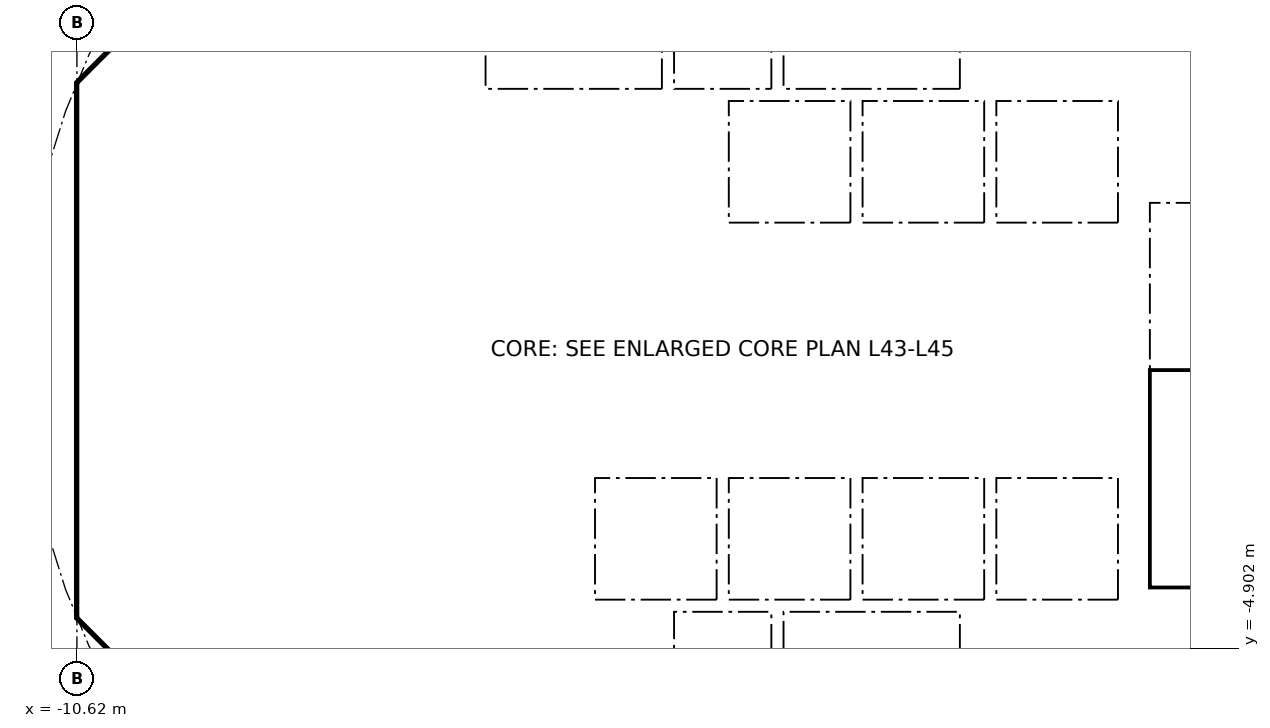
"""IFC4 building model, lengths in metres.
Left out: names, types, materials, properties, quantities, classifications, styles, units other than length and angle.
Written with IfcOpenShell. Run it as: python <this file> out.ifc"""

import sys

from ifc_helpers import new_model, si_unit, direction, frame, frame_2d, origin, place, context, subcontext, project, spatial, polyline, rectangle, outline, extrude, element, fill, save


model = new_model("IFC4")
c1 = context("Model", 3, precision=1e-05, world=origin(), true_north=direction((0.0, 1.0)))
c2 = subcontext(c1, "Body", "Model", "MODEL_VIEW")
j1 = project(units=[si_unit("LENGTHUNIT", "METRE"), si_unit("PLANEANGLEUNIT", "RADIAN")], contexts=[c1])
p1 = place(None, origin())
s1 = spatial("IfcSite", under=j1, at=p1, CompositionType="ELEMENT")
p2 = place(p1, origin())
s2 = spatial("IfcBuilding", under=s1, at=p2, CompositionType="ELEMENT")
p3 = place(p2, frame((0.0, 0.0, 177.0)))
s3 = spatial("IfcBuildingStorey", under=s2, at=p3, CompositionType="ELEMENT", Elevation=177.0)
p4 = place(p3, frame((9.988, 4.613, 0.0), z_axis=(0.0, 0.0, 1.0), x_axis=(-0.707106781187, 0.707106781187, 0.0)))
e1 = element("IfcWall", 1, at=p4, inside=s3, PredefinedType="SHEAR", context=c2, shape_type="SweptSolid", body=[
    extrude(rectangle(XDim=7.602, YDim=0.6, at=frame_2d((3.801, 0.0))), origin(), (0.0, 0.0, 1.0), 3.44),
])
p5 = place(p4, frame((3.201, 0.0, 0.0)))
e2 = element("IfcOpeningElement", 2, at=p5, cuts=e1, PredefinedType="OPENING", context=c2, shape_type="SweptSolid", body=[
    extrude(rectangle(XDim=1.2, YDim=2.1, at=frame_2d((0.6, 1.05))), frame((0.0, 0.31, 0.0), z_axis=(0.0, -1.0, 0.0), x_axis=(1.0, 0.0, 0.0)), (0.0, 0.0, 1.0), 0.62),
])
p6 = place(p3, frame((-4.613, 9.988, 0.0), z_axis=(0.0, 0.0, 1.0), x_axis=(-0.707106781187, -0.707106781187, 0.0)))
e3 = element("IfcWall", 3, at=p6, inside=s3, PredefinedType="SHEAR", context=c2, shape_type="SweptSolid", body=[
    extrude(rectangle(XDim=7.602, YDim=0.6, at=frame_2d((3.801, 0.0))), origin(), (0.0, 0.0, 1.0), 3.44),
])
p7 = place(p6, frame((0.351, 0.0, 0.0)))
e4 = element("IfcOpeningElement", 4, at=p7, cuts=e3, PredefinedType="OPENING", context=c2, shape_type="SweptSolid", body=[
    extrude(rectangle(XDim=1.1, YDim=2.1, at=frame_2d((0.55, 1.05))), frame((0.0, 0.31, 0.0), z_axis=(0.0, -1.0, 0.0), x_axis=(1.0, 0.0, 0.0)), (0.0, 0.0, 1.0), 0.62),
])
p8 = place(p3, frame((-10.325, 3.801, 0.0), z_axis=(0.0, 0.0, 1.0), x_axis=(0.0, -1.0, 0.0)))
e5 = element("IfcWall", 5, at=p8, inside=s3, PredefinedType="SHEAR", context=c2, shape_type="SweptSolid", body=[
    extrude(rectangle(XDim=7.602, YDim=0.6, at=frame_2d((3.801, 0.0))), origin(), (0.0, 0.0, 1.0), 3.44),
])
p9 = place(p8, frame((0.651, 0.0, 0.0)))
e6 = element("IfcOpeningElement", 6, at=p9, cuts=e5, PredefinedType="OPENING", context=c2, shape_type="SweptSolid", body=[
    extrude(rectangle(XDim=1.5, YDim=2.1, at=frame_2d((0.75, 1.05))), frame((0.0, 0.31, 0.0), z_axis=(0.0, -1.0, 0.0), x_axis=(1.0, 0.0, 0.0)), (0.0, 0.0, 1.0), 0.62),
])
p10 = place(p8, frame((5.451, 0.0, 0.0)))
e7 = element("IfcOpeningElement", 7, at=p10, cuts=e5, PredefinedType="OPENING", context=c2, shape_type="SweptSolid", body=[
    extrude(rectangle(XDim=1.5, YDim=2.1, at=frame_2d((0.75, 1.05))), frame((0.0, 0.31, 0.0), z_axis=(0.0, -1.0, 0.0), x_axis=(1.0, 0.0, 0.0)), (0.0, 0.0, 1.0), 0.62),
])
p11 = place(p3, frame((-9.988, -4.613, 0.0), z_axis=(0.0, 0.0, 1.0), x_axis=(0.707106781187, -0.707106781187, 0.0)))
e8 = element("IfcWall", 8, at=p11, inside=s3, PredefinedType="SHEAR", context=c2, shape_type="SweptSolid", body=[
    extrude(rectangle(XDim=7.602, YDim=0.6, at=frame_2d((3.801, 0.0))), origin(), (0.0, 0.0, 1.0), 3.44),
])
p12 = place(p11, frame((6.151, 0.0, 0.0)))
e9 = element("IfcOpeningElement", 9, at=p12, cuts=e8, PredefinedType="OPENING", context=c2, shape_type="SweptSolid", body=[
    extrude(rectangle(XDim=1.1, YDim=2.1, at=frame_2d((0.55, 1.05))), frame((0.0, 0.31, 0.0), z_axis=(0.0, -1.0, 0.0), x_axis=(1.0, 0.0, 0.0)), (0.0, 0.0, 1.0), 0.62),
])
p13 = place(p3, frame((4.613, -9.988, 0.0), z_axis=(0.0, 0.0, 1.0), x_axis=(0.707106781187, 0.707106781187, 0.0)))
e10 = element("IfcWall", 10, at=p13, inside=s3, PredefinedType="SHEAR", context=c2, shape_type="SweptSolid", body=[
    extrude(rectangle(XDim=7.602, YDim=0.6, at=frame_2d((3.801, 0.0))), origin(), (0.0, 0.0, 1.0), 3.44),
])
p14 = place(p13, frame((3.201, 0.0, 0.0)))
e11 = element("IfcOpeningElement", 11, at=p14, cuts=e10, PredefinedType="OPENING", context=c2, shape_type="SweptSolid", body=[
    extrude(rectangle(XDim=1.2, YDim=2.1, at=frame_2d((0.6, 1.05))), frame((0.0, 0.31, 0.0), z_axis=(0.0, -1.0, 0.0), x_axis=(1.0, 0.0, 0.0)), (0.0, 0.0, 1.0), 0.62),
])
p15 = place(p3, frame((-5.8, 4.3, 0.0), z_axis=(0.0, 0.0, 1.0), x_axis=(0.0, 1.0, 0.0)))
e12 = element("IfcWall", 12, at=p15, inside=s3, PredefinedType="PARTITIONING", context=c2, shape_type="SweptSolid", body=[
    extrude(rectangle(XDim=3.927, YDim=0.15, at=frame_2d((1.963, 0.0))), origin(), (0.0, 0.0, 1.0), 3.44),
])
p16 = place(p15, frame((0.413, 0.0, 0.0)))
e13 = element("IfcOpeningElement", 13, at=p16, cuts=e12, PredefinedType="OPENING", context=c2, shape_type="SweptSolid", body=[
    extrude(rectangle(XDim=0.9, YDim=2.1, at=frame_2d((0.45, 1.05))), frame((0.0, 0.085, 0.0), z_axis=(0.0, -1.0, 0.0), x_axis=(1.0, 0.0, 0.0)), (0.0, 0.0, 1.0), 0.17),
])
p17 = place(p15, frame((2.489, 0.0, 0.0)))
e14 = element("IfcOpeningElement", 14, at=p17, cuts=e12, PredefinedType="OPENING", context=c2, shape_type="SweptSolid", body=[
    extrude(rectangle(XDim=0.9, YDim=2.1, at=frame_2d((0.45, 1.05))), frame((0.0, 0.085, 0.0), z_axis=(0.0, -1.0, 0.0), x_axis=(1.0, 0.0, 0.0)), (0.0, 0.0, 1.0), 0.17),
])
p18 = place(p3, frame((4.0, 4.3, 0.0), z_axis=(0.0, 0.0, 1.0), x_axis=(0.0, 1.0, 0.0)))
e15 = element("IfcWall", 15, at=p18, inside=s3, PredefinedType="SOLIDWALL", context=c2, shape_type="SweptSolid", body=[
    extrude(rectangle(XDim=2.2, YDim=0.2, at=frame_2d((1.1, 0.0))), origin(), (0.0, 0.0, 1.0), 3.44),
])
p19 = place(p18, frame((0.55, 0.0, 0.0)))
e16 = element("IfcOpeningElement", 16, at=p19, cuts=e15, PredefinedType="OPENING", context=c2, shape_type="SweptSolid", body=[
    extrude(rectangle(XDim=1.1, YDim=2.1, at=frame_2d((0.55, 1.05))), frame((0.0, 0.11, 0.0), z_axis=(0.0, -1.0, 0.0), x_axis=(1.0, 0.0, 0.0)), (0.0, 0.0, 1.0), 0.22),
])
p20 = place(p3, frame((-4.0, 4.3, 0.0), z_axis=(0.0, 0.0, 1.0), x_axis=(0.0, 1.0, 0.0)))
e17 = element("IfcWall", 17, at=p20, inside=s3, PredefinedType="SOLIDWALL", context=c2, shape_type="SweptSolid", body=[
    extrude(rectangle(XDim=2.2, YDim=0.2, at=frame_2d((1.1, 0.0))), origin(), (0.0, 0.0, 1.0), 3.44),
])
p21 = place(p20, frame((0.55, 0.0, 0.0)))
e18 = element("IfcOpeningElement", 18, at=p21, cuts=e17, PredefinedType="OPENING", context=c2, shape_type="SweptSolid", body=[
    extrude(rectangle(XDim=1.1, YDim=2.1, at=frame_2d((0.55, 1.05))), frame((0.0, 0.11, 0.0), z_axis=(0.0, -1.0, 0.0), x_axis=(1.0, 0.0, 0.0)), (0.0, 0.0, 1.0), 0.22),
])
p22 = place(p3, frame((-6.7, 2.0, 0.0), z_axis=(0.0, 0.0, 1.0), x_axis=(1.0, 0.0, 0.0)))
e19 = element("IfcWall", 19, at=p22, inside=s3, PredefinedType="SOLIDWALL", context=c2, shape_type="SweptSolid", body=[
    extrude(rectangle(XDim=13.4, YDim=0.2, at=frame_2d((6.7, 0.0))), origin(), (0.0, 0.0, 1.0), 3.44),
])
p23 = place(p22, frame((7.25, 0.0, 0.0)))
e20 = element("IfcOpeningElement", 20, at=p23, cuts=e19, PredefinedType="OPENING", context=c2, shape_type="SweptSolid", body=[
    extrude(rectangle(XDim=1.1, YDim=2.1, at=frame_2d((0.55, 1.05))), frame((0.0, 0.11, 0.0), z_axis=(0.0, -1.0, 0.0), x_axis=(1.0, 0.0, 0.0)), (0.0, 0.0, 1.0), 0.22),
])
p24 = place(p22, frame((9.45, 0.0, 0.0)))
e21 = element("IfcOpeningElement", 21, at=p24, cuts=e19, PredefinedType="OPENING", context=c2, shape_type="SweptSolid", body=[
    extrude(rectangle(XDim=1.1, YDim=2.1, at=frame_2d((0.55, 1.05))), frame((0.0, 0.11, 0.0), z_axis=(0.0, -1.0, 0.0), x_axis=(1.0, 0.0, 0.0)), (0.0, 0.0, 1.0), 0.22),
])
p25 = place(p22, frame((0.75, 0.0, 0.0)))
e22 = element("IfcOpeningElement", 22, at=p25, cuts=e19, PredefinedType="OPENING", context=c2, shape_type="SweptSolid", body=[
    extrude(rectangle(XDim=0.9, YDim=2.1, at=frame_2d((0.45, 1.05))), frame((0.0, 0.11, 0.0), z_axis=(0.0, -1.0, 0.0), x_axis=(1.0, 0.0, 0.0)), (0.0, 0.0, 1.0), 0.22),
])
p26 = place(p22, frame((4.05, 0.0, 0.0)))
e23 = element("IfcOpeningElement", 23, at=p26, cuts=e19, PredefinedType="OPENING", context=c2, shape_type="SweptSolid", body=[
    extrude(rectangle(XDim=0.9, YDim=2.1, at=frame_2d((0.45, 1.05))), frame((0.0, 0.11, 0.0), z_axis=(0.0, -1.0, 0.0), x_axis=(1.0, 0.0, 0.0)), (0.0, 0.0, 1.0), 0.22),
])
p27 = place(p3, frame((6.7, 4.0, 0.0), z_axis=(0.0, 0.0, 1.0), x_axis=(1.0, 0.0, 0.0)))
e24 = element("IfcWall", 24, at=p27, inside=s3, PredefinedType="SOLIDWALL", context=c2, shape_type="SweptSolid", body=[
    extrude(rectangle(XDim=3.325, YDim=0.2, at=frame_2d((1.662, 0.0))), origin(), (0.0, 0.0, 1.0), 3.44),
])
p28 = place(p27, frame((1.25, 0.0, 0.0)))
e25 = element("IfcOpeningElement", 25, at=p28, cuts=e24, PredefinedType="OPENING", context=c2, shape_type="SweptSolid", body=[
    extrude(rectangle(XDim=1.1, YDim=2.1, at=frame_2d((0.55, 1.05))), frame((0.0, 0.11, 0.0), z_axis=(0.0, -1.0, 0.0), x_axis=(1.0, 0.0, 0.0)), (0.0, 0.0, 1.0), 0.22),
])
p29 = place(p3, frame((-6.2, -7.827, 0.0), z_axis=(0.0, 0.0, 1.0), x_axis=(0.0, 1.0, 0.0)))
e26 = element("IfcWall", 26, at=p29, inside=s3, PredefinedType="PARTITIONING", context=c2, shape_type="SweptSolid", body=[
    extrude(rectangle(XDim=3.527, YDim=0.15, at=frame_2d((1.763, 0.0))), origin(), (0.0, 0.0, 1.0), 3.44),
])
p30 = place(p29, frame((1.276, 0.0, 0.0)))
e27 = element("IfcOpeningElement", 27, at=p30, cuts=e26, PredefinedType="OPENING", context=c2, shape_type="SweptSolid", body=[
    extrude(rectangle(XDim=0.9, YDim=2.1, at=frame_2d((0.45, 1.05))), frame((0.0, 0.085, 0.0), z_axis=(0.0, -1.0, 0.0), x_axis=(1.0, 0.0, 0.0)), (0.0, 0.0, 1.0), 0.17),
])
p31 = place(p3, frame((4.0, -6.5, 0.0), z_axis=(0.0, 0.0, 1.0), x_axis=(0.0, 1.0, 0.0)))
e28 = element("IfcWall", 28, at=p31, inside=s3, PredefinedType="SOLIDWALL", context=c2, shape_type="SweptSolid", body=[
    extrude(rectangle(XDim=2.2, YDim=0.2, at=frame_2d((1.1, 0.0))), origin(), (0.0, 0.0, 1.0), 3.44),
])
p32 = place(p31, frame((0.55, 0.0, 0.0)))
e29 = element("IfcOpeningElement", 29, at=p32, cuts=e28, PredefinedType="OPENING", context=c2, shape_type="SweptSolid", body=[
    extrude(rectangle(XDim=1.1, YDim=2.1, at=frame_2d((0.55, 1.05))), frame((0.0, 0.11, 0.0), z_axis=(0.0, -1.0, 0.0), x_axis=(1.0, 0.0, 0.0)), (0.0, 0.0, 1.0), 0.22),
])
p33 = place(p3, frame((-4.0, -6.5, 0.0), z_axis=(0.0, 0.0, 1.0), x_axis=(0.0, 1.0, 0.0)))
e30 = element("IfcWall", 30, at=p33, inside=s3, PredefinedType="SOLIDWALL", context=c2, shape_type="SweptSolid", body=[
    extrude(rectangle(XDim=2.2, YDim=0.2, at=frame_2d((1.1, 0.0))), origin(), (0.0, 0.0, 1.0), 3.44),
])
p34 = place(p33, frame((0.65, 0.0, 0.0)))
e31 = element("IfcOpeningElement", 31, at=p34, cuts=e30, PredefinedType="OPENING", context=c2, shape_type="SweptSolid", body=[
    extrude(rectangle(XDim=0.9, YDim=2.1, at=frame_2d((0.45, 1.05))), frame((0.0, 0.11, 0.0), z_axis=(0.0, -1.0, 0.0), x_axis=(1.0, 0.0, 0.0)), (0.0, 0.0, 1.0), 0.22),
])
p35 = place(p3, frame((-6.7, -2.0, 0.0), z_axis=(0.0, 0.0, 1.0), x_axis=(1.0, 0.0, 0.0)))
e32 = element("IfcWall", 32, at=p35, inside=s3, PredefinedType="SOLIDWALL", context=c2, shape_type="SweptSolid", body=[
    extrude(rectangle(XDim=13.4, YDim=0.2, at=frame_2d((6.7, 0.0))), origin(), (0.0, 0.0, 1.0), 3.44),
])
p36 = place(p35, frame((5.05, 0.0, 0.0)))
e33 = element("IfcOpeningElement", 33, at=p36, cuts=e32, PredefinedType="OPENING", context=c2, shape_type="SweptSolid", body=[
    extrude(rectangle(XDim=1.1, YDim=2.1, at=frame_2d((0.55, 1.05))), frame((0.0, 0.11, 0.0), z_axis=(0.0, -1.0, 0.0), x_axis=(1.0, 0.0, 0.0)), (0.0, 0.0, 1.0), 0.22),
])
p37 = place(p35, frame((7.25, 0.0, 0.0)))
e34 = element("IfcOpeningElement", 34, at=p37, cuts=e32, PredefinedType="OPENING", context=c2, shape_type="SweptSolid", body=[
    extrude(rectangle(XDim=1.1, YDim=2.1, at=frame_2d((0.55, 1.05))), frame((0.0, 0.11, 0.0), z_axis=(0.0, -1.0, 0.0), x_axis=(1.0, 0.0, 0.0)), (0.0, 0.0, 1.0), 0.22),
])
p38 = place(p35, frame((1.85, 0.0, 0.0)))
e35 = element("IfcOpeningElement", 35, at=p38, cuts=e32, PredefinedType="OPENING", context=c2, shape_type="SweptSolid", body=[
    extrude(rectangle(XDim=0.9, YDim=2.1, at=frame_2d((0.45, 1.05))), frame((0.0, 0.11, 0.0), z_axis=(0.0, -1.0, 0.0), x_axis=(1.0, 0.0, 0.0)), (0.0, 0.0, 1.0), 0.22),
])
p39 = place(p3, origin())
e36 = element("IfcWall", 36, at=p39, inside=s3, PredefinedType="SHEAR", context=c2, shape_type="SweptSolid", body=[
    extrude(outline(polyline([(-10.625, -3.801), (-10.025, -3.801), (-10.025, -4.152), (-9.776, -4.401), (-10.2, -4.825), (-10.625, -4.401), (-10.625, -3.801)])), origin(), (0.0, 0.0, 1.0), 3.44),
])
p40 = place(p3, origin())
e37 = element("IfcWall", 37, at=p40, inside=s3, PredefinedType="SHEAR", context=c2, shape_type="SweptSolid", body=[
    extrude(outline(polyline([(-10.2, 4.825), (-9.776, 4.401), (-10.025, 4.152), (-10.025, 3.801), (-10.625, 3.801), (-10.625, 4.401), (-10.2, 4.825)])), origin(), (0.0, 0.0, 1.0), 3.44),
])
for number, where, z_axis, x_axis in (
    (38, (-10.025, -4.0, 0.0), (0.0, 0.0, 1.0), (1.0, 0.0, 0.0)),
    (39, (-10.025, 4.0, 0.0), (0.0, 0.0, 1.0), (1.0, 0.0, 0.0)),
):
    element("IfcWall", number, at=place(p3, frame(where, z_axis=z_axis, x_axis=x_axis)), inside=s3, PredefinedType="PARTITIONING", context=c2, shape_type="SweptSolid", body=[
        extrude(rectangle(XDim=3.325, YDim=0.2, at=frame_2d((1.662, 0.0))), origin(), (0.0, 0.0, 1.0), 3.44),
    ])
for number, where, z_axis, x_axis in (
    (40, (-0.9, 4.3, 0.0), (0.0, 0.0, 1.0), (0.0, 1.0, 0.0)),
    (41, (0.9, 4.3, 0.0), (0.0, 0.0, 1.0), (0.0, 1.0, 0.0)),
):
    element("IfcWall", number, at=place(p3, frame(where, z_axis=z_axis, x_axis=x_axis)), inside=s3, PredefinedType="SOLIDWALL", context=c2, shape_type="SweptSolid", body=[
        extrude(rectangle(XDim=2.2, YDim=0.2, at=frame_2d((1.1, 0.0))), origin(), (0.0, 0.0, 1.0), 3.44),
    ])
p41 = place(p3, origin())
e42 = element("IfcWall", 42, at=p41, inside=s3, PredefinedType="SOLIDWALL", context=c2, shape_type="SweptSolid", body=[
    extrude(outline(polyline([(-6.7, 4.3), (6.7, 4.3), (6.7, 2.1), (6.5, 2.1), (6.5, 4.1), (4.5, 4.1), (4.5, 2.1), (4.3, 2.1), (4.3, 4.1), (2.3, 4.1), (2.3, 2.1), (2.1, 2.1), (2.1, 4.1), (0.1, 4.1), (0.1, 2.1), (-0.1, 2.1), (-0.1, 4.1), (-4.3, 4.1), (-4.3, 2.1), (-4.5, 2.1), (-4.5, 4.1), (-6.5, 4.1), (-6.5, 2.1), (-6.7, 2.1), (-6.7, 4.3)])), origin(), (0.0, 0.0, 1.0), 3.44),
])
for number, where, z_axis, x_axis in (
    (43, (-0.9, -6.5, 0.0), (0.0, 0.0, 1.0), (0.0, 1.0, 0.0)),
    (44, (0.9, -6.5, 0.0), (0.0, 0.0, 1.0), (0.0, 1.0, 0.0)),
):
    element("IfcWall", number, at=place(p3, frame(where, z_axis=z_axis, x_axis=x_axis)), inside=s3, PredefinedType="SOLIDWALL", context=c2, shape_type="SweptSolid", body=[
        extrude(rectangle(XDim=2.2, YDim=0.2, at=frame_2d((1.1, 0.0))), origin(), (0.0, 0.0, 1.0), 3.44),
    ])
p42 = place(p3, origin())
e45 = element("IfcWall", 45, at=p42, inside=s3, PredefinedType="SOLIDWALL", context=c2, shape_type="SweptSolid", body=[
    extrude(outline(polyline([(-6.7, -2.1), (-6.5, -2.1), (-6.5, -4.1), (-2.3, -4.1), (-2.3, -2.1), (-2.1, -2.1), (-2.1, -4.1), (-0.1, -4.1), (-0.1, -2.1), (0.1, -2.1), (0.1, -4.1), (2.1, -4.1), (2.1, -2.1), (2.3, -2.1), (2.3, -4.1), (4.3, -4.1), (4.3, -2.1), (4.5, -2.1), (4.5, -4.1), (6.5, -4.1), (6.5, -2.1), (6.7, -2.1), (6.7, -4.3), (-6.7, -4.3), (-6.7, -2.1)])), origin(), (0.0, 0.0, 1.0), 3.44),
])
p43 = place(p3, origin())
e46 = element("IfcWall", 46, at=p43, inside=s3, PredefinedType="SOLIDWALL", context=c2, shape_type="SweptSolid", body=[
    extrude(outline(polyline([(7.025, -3.9), (6.7, -3.9), (6.7, 3.9), (7.025, 3.9), (7.025, -3.9)])), origin(), (0.0, 0.0, 1.0), 3.44),
])
p44 = place(p3, origin())
e47 = element("IfcWall", 47, at=p44, inside=s3, PredefinedType="SOLIDWALL", context=c2, shape_type="SweptSolid", body=[
    extrude(outline(polyline([(10.025, -4.1), (6.7, -4.1), (6.7, -3.9), (10.025, -3.9), (10.025, -4.1)])), origin(), (0.0, 0.0, 1.0), 3.44),
])
p45 = place(p23, origin())
e48 = element("IfcDoor", 48, at=p45, inside=s3, OperationType="DOUBLE_DOOR_SLIDING", PredefinedType="DOOR", context=c2, shape_type="SweptSolid", body=[
    extrude(rectangle(XDim=1.1, YDim=2.1, at=frame_2d((0.55, 1.05))), frame((0.0, 0.025, 0.0), z_axis=(0.0, -1.0, 0.0), x_axis=(1.0, 0.0, 0.0)), (0.0, 0.0, 1.0), 0.05),
])
fill(e20, e48)
p46 = place(p24, origin())
e49 = element("IfcDoor", 49, at=p46, inside=s3, OperationType="DOUBLE_DOOR_SLIDING", PredefinedType="DOOR", context=c2, shape_type="SweptSolid", body=[
    extrude(rectangle(XDim=1.1, YDim=2.1, at=frame_2d((0.55, 1.05))), frame((0.0, 0.025, 0.0), z_axis=(0.0, -1.0, 0.0), x_axis=(1.0, 0.0, 0.0)), (0.0, 0.0, 1.0), 0.05),
])
fill(e21, e49)
p47 = place(p36, origin())
e50 = element("IfcDoor", 50, at=p47, inside=s3, OperationType="DOUBLE_DOOR_SLIDING", PredefinedType="DOOR", context=c2, shape_type="SweptSolid", body=[
    extrude(rectangle(XDim=1.1, YDim=2.1, at=frame_2d((0.55, 1.05))), frame((0.0, 0.025, 0.0), z_axis=(0.0, -1.0, 0.0), x_axis=(1.0, 0.0, 0.0)), (0.0, 0.0, 1.0), 0.05),
])
fill(e33, e50)
p48 = place(p37, origin())
e51 = element("IfcDoor", 51, at=p48, inside=s3, OperationType="DOUBLE_DOOR_SLIDING", PredefinedType="DOOR", context=c2, shape_type="SweptSolid", body=[
    extrude(rectangle(XDim=1.1, YDim=2.1, at=frame_2d((0.55, 1.05))), frame((0.0, 0.025, 0.0), z_axis=(0.0, -1.0, 0.0), x_axis=(1.0, 0.0, 0.0)), (0.0, 0.0, 1.0), 0.05),
])
fill(e34, e51)
p49 = place(p19, origin())
e52 = element("IfcDoor", 52, at=p49, inside=s3, OperationType="DOUBLE_DOOR_SLIDING", PredefinedType="DOOR", context=c2, shape_type="SweptSolid", body=[
    extrude(rectangle(XDim=1.1, YDim=2.1, at=frame_2d((0.55, 1.05))), frame((0.0, 0.025, 0.0), z_axis=(0.0, -1.0, 0.0), x_axis=(1.0, 0.0, 0.0)), (0.0, 0.0, 1.0), 0.05),
])
fill(e16, e52)
p50 = place(p32, origin())
e53 = element("IfcDoor", 53, at=p50, inside=s3, OperationType="DOUBLE_DOOR_SLIDING", PredefinedType="DOOR", context=c2, shape_type="SweptSolid", body=[
    extrude(rectangle(XDim=1.1, YDim=2.1, at=frame_2d((0.55, 1.05))), frame((0.0, 0.025, 0.0), z_axis=(0.0, -1.0, 0.0), x_axis=(1.0, 0.0, 0.0)), (0.0, 0.0, 1.0), 0.05),
])
fill(e29, e53)
p51 = place(p21, origin())
e54 = element("IfcDoor", 54, at=p51, inside=s3, OperationType="DOUBLE_DOOR_SLIDING", PredefinedType="DOOR", context=c2, shape_type="SweptSolid", body=[
    extrude(rectangle(XDim=1.1, YDim=2.1, at=frame_2d((0.55, 1.05))), frame((0.0, 0.025, 0.0), z_axis=(0.0, -1.0, 0.0), x_axis=(1.0, 0.0, 0.0)), (0.0, 0.0, 1.0), 0.05),
])
fill(e18, e54)
p52 = place(p16, origin())
e55 = element("IfcDoor", 55, at=p52, inside=s3, OperationType="SINGLE_SWING_LEFT", PredefinedType="DOOR", context=c2, shape_type="SweptSolid", body=[
    extrude(rectangle(XDim=0.9, YDim=2.1, at=frame_2d((0.45, 1.05))), frame((0.0, 0.025, 0.0), z_axis=(0.0, -1.0, 0.0), x_axis=(1.0, 0.0, 0.0)), (0.0, 0.0, 1.0), 0.05),
])
fill(e13, e55)
p53 = place(p25, origin())
e56 = element("IfcDoor", 56, at=p53, inside=s3, OperationType="SINGLE_SWING_RIGHT", PredefinedType="DOOR", context=c2, shape_type="SweptSolid", body=[
    extrude(rectangle(XDim=0.9, YDim=2.1, at=frame_2d((0.45, 1.05))), frame((0.0, 0.025, 0.0), z_axis=(0.0, -1.0, 0.0), x_axis=(1.0, 0.0, 0.0)), (0.0, 0.0, 1.0), 0.05),
])
fill(e22, e56)
p54 = place(p26, origin())
e57 = element("IfcDoor", 57, at=p54, inside=s3, OperationType="SINGLE_SWING_RIGHT", PredefinedType="DOOR", context=c2, shape_type="SweptSolid", body=[
    extrude(rectangle(XDim=0.9, YDim=2.1, at=frame_2d((0.45, 1.05))), frame((0.0, 0.025, 0.0), z_axis=(0.0, -1.0, 0.0), x_axis=(1.0, 0.0, 0.0)), (0.0, 0.0, 1.0), 0.05),
])
fill(e23, e57)
p55 = place(p38, frame((0.9, 0.0, 0.0), x_axis=(-1.0, 0.0, 0.0)))
e58 = element("IfcDoor", 58, at=p55, inside=s3, OperationType="SINGLE_SWING_LEFT", PredefinedType="DOOR", context=c2, shape_type="SweptSolid", body=[
    extrude(rectangle(XDim=0.9, YDim=2.1, at=frame_2d((0.45, 1.05))), frame((0.0, 0.025, 0.0), z_axis=(0.0, -1.0, 0.0), x_axis=(1.0, 0.0, 0.0)), (0.0, 0.0, 1.0), 0.05),
])
fill(e35, e58)
p56 = place(p9, origin())
e59 = element("IfcDoor", 59, at=p56, inside=s3, OperationType="DOUBLE_DOOR_SINGLE_SWING", PredefinedType="DOOR", context=c2, shape_type="SweptSolid", body=[
    extrude(rectangle(XDim=1.5, YDim=2.1, at=frame_2d((0.75, 1.05))), frame((0.0, 0.025, 0.0), z_axis=(0.0, -1.0, 0.0), x_axis=(1.0, 0.0, 0.0)), (0.0, 0.0, 1.0), 0.05),
])
fill(e6, e59)
p57 = place(p10, origin())
e60 = element("IfcDoor", 60, at=p57, inside=s3, OperationType="DOUBLE_DOOR_SINGLE_SWING", PredefinedType="DOOR", context=c2, shape_type="SweptSolid", body=[
    extrude(rectangle(XDim=1.5, YDim=2.1, at=frame_2d((0.75, 1.05))), frame((0.0, 0.025, 0.0), z_axis=(0.0, -1.0, 0.0), x_axis=(1.0, 0.0, 0.0)), (0.0, 0.0, 1.0), 0.05),
])
fill(e7, e60)
save(model, sys.argv[1])
